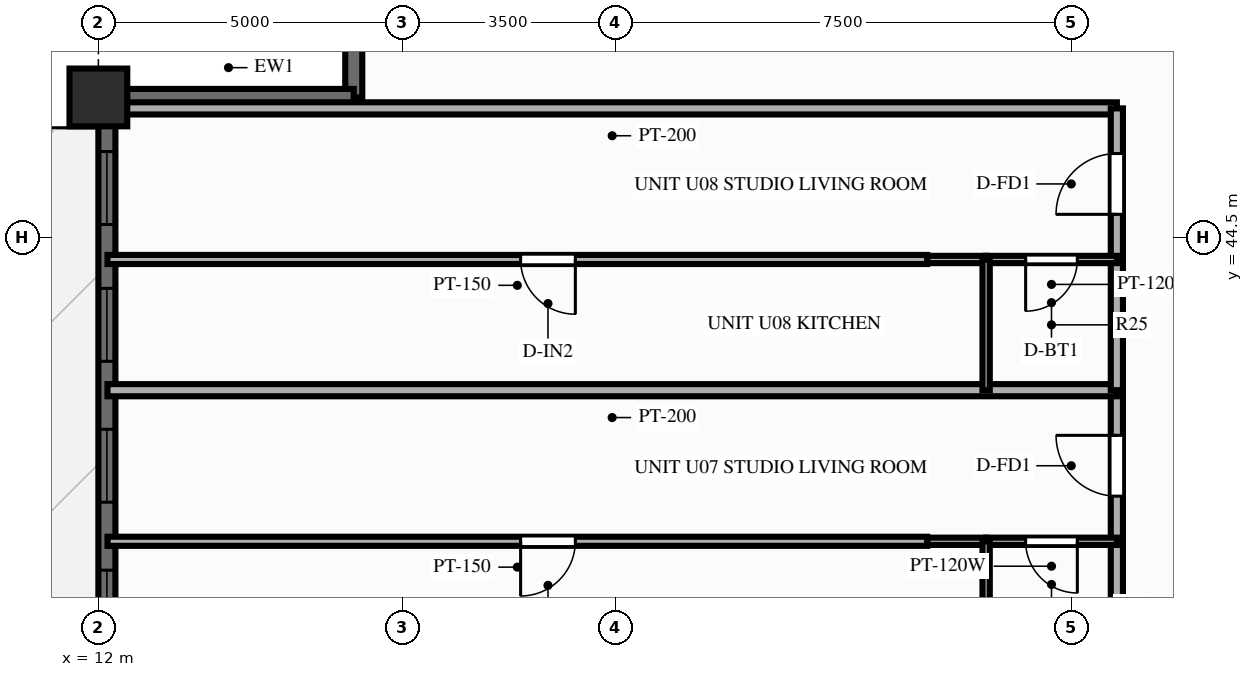
"""IFC4 building model, lengths in metres.
Left out: names, types, materials, properties, quantities, classifications, styles, units other than length and angle.
Written with IfcOpenShell. Run it as: python <this file> out.ifc"""

import sys

from ifc_helpers import new_model, si_unit, direction, frame, frame_2d, origin, origin_2d, place, context, subcontext, project, spatial, rectangle, extrude, source, transform, mapped, element, fill, save


model = new_model("IFC4")
c1 = context("Model", 3, precision=1e-05, world=origin(), true_north=direction((0.0, 1.0)))
c2 = subcontext(c1, "Body", "Model", "MODEL_VIEW")
j1 = project(units=[si_unit("LENGTHUNIT", "METRE"), si_unit("PLANEANGLEUNIT", "RADIAN")], contexts=[c1])
p1 = place(None, origin())
s1 = spatial("IfcSite", under=j1, at=p1, CompositionType="ELEMENT")
p2 = place(p1, origin())
s2 = spatial("IfcBuilding", under=s1, at=p2, CompositionType="ELEMENT")
p3 = place(p2, frame((0.0, 0.0, 122.85)))
s3 = spatial("IfcBuildingStorey", under=s2, at=p3, CompositionType="ELEMENT", Elevation=122.85)
m1 = source(origin(), c2, "Body", "SweptSolid", [
    extrude(rectangle(XDim=0.95, YDim=0.95, at=origin_2d()), origin(), (0.0, 0.0, 1.0), 3.9),
])
p4 = place(p3, frame((12.0, 46.8, 0.0), z_axis=(0.0, 0.0, 1.0), x_axis=(1.0, 0.0, 0.0)))
e1 = element("IfcColumn", 1, at=p4, inside=s3, PredefinedType="COLUMN", context=c2, shape_type="MappedRepresentation", body=[
    mapped(m1, transform((0.0, 0.0, 0.0), scale=1.0)),
])
p5 = place(p3, frame((12.14, 7.2, 0.0), z_axis=(0.0, 0.0, 1.0), x_axis=(0.0, 1.0, 0.0)))
e2 = element("IfcWall", 2, at=p5, inside=s3, PredefinedType="SOLIDWALL", context=c2, shape_type="SweptSolid", body=[
    extrude(rectangle(XDim=39.6, YDim=0.28, at=frame_2d((19.8, 0.0))), origin(), (0.0, 0.0, 1.0), 2.24),
])
p6 = place(p5, frame((0.89, 0.0, 0.25)))
e3 = element("IfcOpeningElement", 3, at=p6, cuts=e2, PredefinedType="OPENING", context=c2, shape_type="SweptSolid", body=[
    extrude(rectangle(XDim=1.2, YDim=1.5, at=frame_2d((0.6, 0.75))), frame((0.0, 0.152, 0.0), z_axis=(0.0, -1.0, 0.0), x_axis=(1.0, 0.0, 0.0)), (0.0, 0.0, 1.0), 0.304),
])
p7 = place(p5, frame((3.14, 0.0, 0.25)))
e4 = element("IfcOpeningElement", 4, at=p7, cuts=e2, PredefinedType="OPENING", context=c2, shape_type="SweptSolid", body=[
    extrude(rectangle(XDim=1.2, YDim=1.5, at=frame_2d((0.6, 0.75))), frame((0.0, 0.152, 0.0), z_axis=(0.0, -1.0, 0.0), x_axis=(1.0, 0.0, 0.0)), (0.0, 0.0, 1.0), 0.304),
])
p8 = place(p5, frame((5.458, 0.0, 0.25)))
e5 = element("IfcOpeningElement", 5, at=p8, cuts=e2, PredefinedType="OPENING", context=c2, shape_type="SweptSolid", body=[
    extrude(rectangle(XDim=1.2, YDim=1.5, at=frame_2d((0.6, 0.75))), frame((0.0, 0.152, 0.0), z_axis=(0.0, -1.0, 0.0), x_axis=(1.0, 0.0, 0.0)), (0.0, 0.0, 1.0), 0.304),
])
p9 = place(p5, frame((7.775, 0.0, 0.25)))
e6 = element("IfcOpeningElement", 6, at=p9, cuts=e2, PredefinedType="OPENING", context=c2, shape_type="SweptSolid", body=[
    extrude(rectangle(XDim=1.2, YDim=1.5, at=frame_2d((0.6, 0.75))), frame((0.0, 0.152, 0.0), z_axis=(0.0, -1.0, 0.0), x_axis=(1.0, 0.0, 0.0)), (0.0, 0.0, 1.0), 0.304),
])
p10 = place(p5, frame((12.242, 0.0, 0.25)))
e7 = element("IfcOpeningElement", 7, at=p10, cuts=e2, PredefinedType="OPENING", context=c2, shape_type="SweptSolid", body=[
    extrude(rectangle(XDim=1.2, YDim=1.5, at=frame_2d((0.6, 0.75))), frame((0.0, 0.152, 0.0), z_axis=(0.0, -1.0, 0.0), x_axis=(1.0, 0.0, 0.0)), (0.0, 0.0, 1.0), 0.304),
])
p11 = place(p5, frame((14.56, 0.0, 0.25)))
e8 = element("IfcOpeningElement", 8, at=p11, cuts=e2, PredefinedType="OPENING", context=c2, shape_type="SweptSolid", body=[
    extrude(rectangle(XDim=1.2, YDim=1.5, at=frame_2d((0.6, 0.75))), frame((0.0, 0.152, 0.0), z_axis=(0.0, -1.0, 0.0), x_axis=(1.0, 0.0, 0.0)), (0.0, 0.0, 1.0), 0.304),
])
p12 = place(p5, frame((16.877, 0.0, 0.25)))
e9 = element("IfcOpeningElement", 9, at=p12, cuts=e2, PredefinedType="OPENING", context=c2, shape_type="SweptSolid", body=[
    extrude(rectangle(XDim=1.2, YDim=1.5, at=frame_2d((0.6, 0.75))), frame((0.0, 0.152, 0.0), z_axis=(0.0, -1.0, 0.0), x_axis=(1.0, 0.0, 0.0)), (0.0, 0.0, 1.0), 0.304),
])
p13 = place(p5, frame((19.25, 0.0, 0.0)))
e10 = element("IfcOpeningElement", 10, at=p13, cuts=e2, PredefinedType="OPENING", context=c2, shape_type="SweptSolid", body=[
    extrude(rectangle(XDim=1.1, YDim=2.15, at=frame_2d((0.55, 1.075))), frame((0.0, 0.152, 0.0), z_axis=(0.0, -1.0, 0.0), x_axis=(1.0, 0.0, 0.0)), (0.0, 0.0, 1.0), 0.304),
])
p14 = place(p5, frame((21.522, 0.0, 0.25)))
e11 = element("IfcOpeningElement", 11, at=p14, cuts=e2, PredefinedType="OPENING", context=c2, shape_type="SweptSolid", body=[
    extrude(rectangle(XDim=1.2, YDim=1.5, at=frame_2d((0.6, 0.75))), frame((0.0, 0.152, 0.0), z_axis=(0.0, -1.0, 0.0), x_axis=(1.0, 0.0, 0.0)), (0.0, 0.0, 1.0), 0.304),
])
p15 = place(p5, frame((23.84, 0.0, 0.25)))
e12 = element("IfcOpeningElement", 12, at=p15, cuts=e2, PredefinedType="OPENING", context=c2, shape_type="SweptSolid", body=[
    extrude(rectangle(XDim=1.2, YDim=1.5, at=frame_2d((0.6, 0.75))), frame((0.0, 0.152, 0.0), z_axis=(0.0, -1.0, 0.0), x_axis=(1.0, 0.0, 0.0)), (0.0, 0.0, 1.0), 0.304),
])
p16 = place(p5, frame((26.157, 0.0, 0.25)))
e13 = element("IfcOpeningElement", 13, at=p16, cuts=e2, PredefinedType="OPENING", context=c2, shape_type="SweptSolid", body=[
    extrude(rectangle(XDim=1.2, YDim=1.5, at=frame_2d((0.6, 0.75))), frame((0.0, 0.152, 0.0), z_axis=(0.0, -1.0, 0.0), x_axis=(1.0, 0.0, 0.0)), (0.0, 0.0, 1.0), 0.304),
])
p17 = place(p5, frame((30.625, 0.0, 0.25)))
e14 = element("IfcOpeningElement", 14, at=p17, cuts=e2, PredefinedType="OPENING", context=c2, shape_type="SweptSolid", body=[
    extrude(rectangle(XDim=1.2, YDim=1.5, at=frame_2d((0.6, 0.75))), frame((0.0, 0.152, 0.0), z_axis=(0.0, -1.0, 0.0), x_axis=(1.0, 0.0, 0.0)), (0.0, 0.0, 1.0), 0.304),
])
p18 = place(p5, frame((32.942, 0.0, 0.25)))
e15 = element("IfcOpeningElement", 15, at=p18, cuts=e2, PredefinedType="OPENING", context=c2, shape_type="SweptSolid", body=[
    extrude(rectangle(XDim=1.2, YDim=1.5, at=frame_2d((0.6, 0.75))), frame((0.0, 0.152, 0.0), z_axis=(0.0, -1.0, 0.0), x_axis=(1.0, 0.0, 0.0)), (0.0, 0.0, 1.0), 0.304),
])
p19 = place(p5, frame((35.26, 0.0, 0.25)))
e16 = element("IfcOpeningElement", 16, at=p19, cuts=e2, PredefinedType="OPENING", context=c2, shape_type="SweptSolid", body=[
    extrude(rectangle(XDim=1.2, YDim=1.5, at=frame_2d((0.6, 0.75))), frame((0.0, 0.152, 0.0), z_axis=(0.0, -1.0, 0.0), x_axis=(1.0, 0.0, 0.0)), (0.0, 0.0, 1.0), 0.304),
])
p20 = place(p5, frame((37.51, 0.0, 0.25)))
e17 = element("IfcOpeningElement", 17, at=p20, cuts=e2, PredefinedType="OPENING", context=c2, shape_type="SweptSolid", body=[
    extrude(rectangle(XDim=1.2, YDim=1.5, at=frame_2d((0.6, 0.75))), frame((0.0, 0.152, 0.0), z_axis=(0.0, -1.0, 0.0), x_axis=(1.0, 0.0, 0.0)), (0.0, 0.0, 1.0), 0.304),
])
for number, where, z_axis, x_axis in (
    (18, (16.2, 46.8, 0.0), (0.0, 0.0, 1.0), (0.0, 1.0, 0.0)),
    (19, (12.08, 46.8, 0.0), (0.0, 0.0, 1.0), (1.0, 0.0, 0.0)),
):
    element("IfcWall", number, at=place(p3, frame(where, z_axis=z_axis, x_axis=x_axis)), inside=s3, PredefinedType="SOLIDWALL", context=c2, shape_type="SweptSolid", body=[
        extrude(rectangle(XDim=4.12, YDim=0.28, at=frame_2d((2.06, 0.0))), origin(), (0.0, 0.0, 1.0), 2.24),
    ])
p21 = place(p3, frame((28.75, 46.62, 0.0), z_axis=(0.0, 0.0, 1.0), x_axis=(-1.0, 0.0, 0.0)))
e20 = element("IfcWall", 20, at=p21, inside=s3, PredefinedType="PARTITIONING", context=c2, shape_type="SweptSolid", body=[
    extrude(rectangle(XDim=16.6, YDim=0.2, at=frame_2d((8.3, 0.0))), origin(), (0.0, 0.0, 1.0), 3.56),
])
p22 = place(p3, frame((28.75, 37.35, 0.0), z_axis=(0.0, 0.0, 1.0), x_axis=(0.0, 1.0, 0.0)))
e21 = element("IfcWall", 21, at=p22, inside=s3, PredefinedType="PARTITIONING", context=c2, shape_type="SweptSolid", body=[
    extrude(rectangle(XDim=2.15, YDim=0.2, at=frame_2d((1.075, 0.0))), origin(), (0.0, 0.0, 1.0), 3.56),
])
p23 = place(p3, frame((28.75, 39.5, 0.0), z_axis=(0.0, 0.0, 1.0), x_axis=(0.0, 1.0, 0.0)))
e22 = element("IfcWall", 22, at=p23, inside=s3, PredefinedType="PARTITIONING", context=c2, shape_type="SweptSolid", body=[
    extrude(rectangle(XDim=2.485, YDim=0.2, at=frame_2d((1.243, 0.0))), origin(), (0.0, 0.0, 1.0), 3.56),
])
p24 = place(p23, frame((0.742, 0.0, 0.0)))
e23 = element("IfcOpeningElement", 23, at=p24, cuts=e22, PredefinedType="OPENING", context=c2, shape_type="SweptSolid", body=[
    extrude(rectangle(XDim=1.0, YDim=2.15, at=frame_2d((0.5, 1.075))), frame((0.0, 0.112, 0.0), z_axis=(0.0, -1.0, 0.0), x_axis=(1.0, 0.0, 0.0)), (0.0, 0.0, 1.0), 0.224),
])
p25 = place(p3, frame((28.75, 39.5, 0.0), z_axis=(0.0, 0.0, 1.0), x_axis=(-1.0, 0.0, 0.0)))
e24 = element("IfcWall", 24, at=p25, inside=s3, PredefinedType="PARTITIONING", context=c2, shape_type="SweptSolid", body=[
    extrude(rectangle(XDim=2.15, YDim=0.12, at=frame_2d((1.075, 0.0))), origin(), (0.0, 0.0, 1.0), 3.56),
])
p26 = place(p25, frame((0.65, 0.0, 0.0)))
e25 = element("IfcOpeningElement", 25, at=p26, cuts=e24, PredefinedType="OPENING", context=c2, shape_type="SweptSolid", body=[
    extrude(rectangle(XDim=0.85, YDim=2.05, at=frame_2d((0.425, 1.025))), frame((0.0, 0.072, 0.0), z_axis=(0.0, -1.0, 0.0), x_axis=(1.0, 0.0, 0.0)), (0.0, 0.0, 1.0), 0.144),
])
p27 = place(p3, frame((26.6, 39.5, 0.0), z_axis=(0.0, 0.0, 1.0), x_axis=(-1.0, 0.0, 0.0)))
e26 = element("IfcWall", 26, at=p27, inside=s3, PredefinedType="PARTITIONING", context=c2, shape_type="SweptSolid", body=[
    extrude(rectangle(XDim=0.97, YDim=0.12, at=frame_2d((0.485, 0.0))), origin(), (0.0, 0.0, 1.0), 3.56),
])
p28 = place(p3, frame((26.6, 37.35, 0.0), z_axis=(0.0, 0.0, 1.0), x_axis=(0.0, 1.0, 0.0)))
e27 = element("IfcWall", 27, at=p28, inside=s3, PredefinedType="PARTITIONING", context=c2, shape_type="SweptSolid", body=[
    extrude(rectangle(XDim=2.15, YDim=0.12, at=frame_2d((1.075, 0.0))), origin(), (0.0, 0.0, 1.0), 3.56),
])
p29 = place(p3, frame((25.63, 39.5, 0.0), z_axis=(0.0, 0.0, 1.0), x_axis=(-1.0, 0.0, 0.0)))
e28 = element("IfcWall", 28, at=p29, inside=s3, PredefinedType="PARTITIONING", context=c2, shape_type="SweptSolid", body=[
    extrude(rectangle(XDim=13.48, YDim=0.15, at=frame_2d((6.74, 0.0))), origin(), (0.0, 0.0, 1.0), 3.56),
])
p30 = place(p29, frame((5.786, 0.0, 0.0)))
e29 = element("IfcOpeningElement", 29, at=p30, cuts=e28, PredefinedType="OPENING", context=c2, shape_type="SweptSolid", body=[
    extrude(rectangle(XDim=0.9, YDim=2.1, at=frame_2d((0.45, 1.05))), frame((0.0, 0.087, 0.0), z_axis=(0.0, -1.0, 0.0), x_axis=(1.0, 0.0, 0.0)), (0.0, 0.0, 1.0), 0.174),
])
p31 = place(p3, frame((28.75, 41.985, 0.0), z_axis=(0.0, 0.0, 1.0), x_axis=(-1.0, 0.0, 0.0)))
e30 = element("IfcWall", 30, at=p31, inside=s3, PredefinedType="PARTITIONING", context=c2, shape_type="SweptSolid", body=[
    extrude(rectangle(XDim=16.6, YDim=0.2, at=frame_2d((8.3, 0.0))), origin(), (0.0, 0.0, 1.0), 3.56),
])
p32 = place(p3, frame((28.75, 41.985, 0.0), z_axis=(0.0, 0.0, 1.0), x_axis=(0.0, 1.0, 0.0)))
e31 = element("IfcWall", 31, at=p32, inside=s3, PredefinedType="PARTITIONING", context=c2, shape_type="SweptSolid", body=[
    extrude(rectangle(XDim=2.15, YDim=0.2, at=frame_2d((1.075, 0.0))), origin(), (0.0, 0.0, 1.0), 3.56),
])
p33 = place(p3, frame((28.75, 44.135, 0.0), z_axis=(0.0, 0.0, 1.0), x_axis=(0.0, 1.0, 0.0)))
e32 = element("IfcWall", 32, at=p33, inside=s3, PredefinedType="PARTITIONING", context=c2, shape_type="SweptSolid", body=[
    extrude(rectangle(XDim=2.485, YDim=0.2, at=frame_2d((1.243, 0.0))), origin(), (0.0, 0.0, 1.0), 3.56),
])
p34 = place(p33, frame((0.742, 0.0, 0.0)))
e33 = element("IfcOpeningElement", 33, at=p34, cuts=e32, PredefinedType="OPENING", context=c2, shape_type="SweptSolid", body=[
    extrude(rectangle(XDim=1.0, YDim=2.15, at=frame_2d((0.5, 1.075))), frame((0.0, 0.112, 0.0), z_axis=(0.0, -1.0, 0.0), x_axis=(1.0, 0.0, 0.0)), (0.0, 0.0, 1.0), 0.224),
])
p35 = place(p3, frame((28.75, 44.135, 0.0), z_axis=(0.0, 0.0, 1.0), x_axis=(-1.0, 0.0, 0.0)))
e34 = element("IfcWall", 34, at=p35, inside=s3, PredefinedType="PARTITIONING", context=c2, shape_type="SweptSolid", body=[
    extrude(rectangle(XDim=2.15, YDim=0.12, at=frame_2d((1.075, 0.0))), origin(), (0.0, 0.0, 1.0), 3.56),
])
p36 = place(p35, frame((0.65, 0.0, 0.0)))
e35 = element("IfcOpeningElement", 35, at=p36, cuts=e34, PredefinedType="OPENING", context=c2, shape_type="SweptSolid", body=[
    extrude(rectangle(XDim=0.85, YDim=2.05, at=frame_2d((0.425, 1.025))), frame((0.0, 0.072, 0.0), z_axis=(0.0, -1.0, 0.0), x_axis=(1.0, 0.0, 0.0)), (0.0, 0.0, 1.0), 0.144),
])
p37 = place(p3, frame((26.6, 44.135, 0.0), z_axis=(0.0, 0.0, 1.0), x_axis=(-1.0, 0.0, 0.0)))
e36 = element("IfcWall", 36, at=p37, inside=s3, PredefinedType="PARTITIONING", context=c2, shape_type="SweptSolid", body=[
    extrude(rectangle(XDim=0.97, YDim=0.12, at=frame_2d((0.485, 0.0))), origin(), (0.0, 0.0, 1.0), 3.56),
])
p38 = place(p3, frame((26.6, 41.985, 0.0), z_axis=(0.0, 0.0, 1.0), x_axis=(0.0, 1.0, 0.0)))
e37 = element("IfcWall", 37, at=p38, inside=s3, PredefinedType="PARTITIONING", context=c2, shape_type="SweptSolid", body=[
    extrude(rectangle(XDim=2.15, YDim=0.12, at=frame_2d((1.075, 0.0))), origin(), (0.0, 0.0, 1.0), 3.56),
])
p39 = place(p3, frame((25.63, 44.135, 0.0), z_axis=(0.0, 0.0, 1.0), x_axis=(-1.0, 0.0, 0.0)))
e38 = element("IfcWall", 38, at=p39, inside=s3, PredefinedType="PARTITIONING", context=c2, shape_type="SweptSolid", body=[
    extrude(rectangle(XDim=13.48, YDim=0.15, at=frame_2d((6.74, 0.0))), origin(), (0.0, 0.0, 1.0), 3.56),
])
p40 = place(p39, frame((5.786, 0.0, 0.0)))
e39 = element("IfcOpeningElement", 39, at=p40, cuts=e38, PredefinedType="OPENING", context=c2, shape_type="SweptSolid", body=[
    extrude(rectangle(XDim=0.9, YDim=2.1, at=frame_2d((0.45, 1.05))), frame((0.0, 0.087, 0.0), z_axis=(0.0, -1.0, 0.0), x_axis=(1.0, 0.0, 0.0)), (0.0, 0.0, 1.0), 0.174),
])
m2 = source(origin(), c2, "Body", "SweptSolid", [
    extrude(rectangle(XDim=1.2, YDim=1.5, at=frame_2d((0.6, 0.75))), frame((0.0, 0.03, 0.0), z_axis=(0.0, -1.0, 0.0), x_axis=(1.0, 0.0, 0.0)), (0.0, 0.0, 1.0), 0.06),
])
p41 = place(p17, origin())
e40 = element("IfcWindow", 40, at=p41, inside=s3, PartitioningType="SINGLE_PANEL", PredefinedType="WINDOW", context=c2, shape_type="MappedRepresentation", body=[
    mapped(m2, transform((0.0, 0.0, 0.0), scale=1.0)),
])
fill(e14, e40)
p42 = place(p18, origin())
e41 = element("IfcWindow", 41, at=p42, inside=s3, PartitioningType="SINGLE_PANEL", PredefinedType="WINDOW", context=c2, shape_type="MappedRepresentation", body=[
    mapped(m2, transform((0.0, 0.0, 0.0), scale=1.0)),
])
fill(e15, e41)
p43 = place(p19, origin())
e42 = element("IfcWindow", 42, at=p43, inside=s3, PartitioningType="SINGLE_PANEL", PredefinedType="WINDOW", context=c2, shape_type="MappedRepresentation", body=[
    mapped(m2, transform((0.0, 0.0, 0.0), scale=1.0)),
])
fill(e16, e42)
p44 = place(p20, origin())
e43 = element("IfcWindow", 43, at=p44, inside=s3, PartitioningType="SINGLE_PANEL", PredefinedType="WINDOW", context=c2, shape_type="MappedRepresentation", body=[
    mapped(m2, transform((0.0, 0.0, 0.0), scale=1.0)),
])
fill(e17, e43)
m3 = source(origin(), c2, "Body", "SweptSolid", [
    extrude(rectangle(XDim=1.0, YDim=2.15, at=frame_2d((0.5, 1.075))), frame((0.0, 0.025, 0.0), z_axis=(0.0, -1.0, 0.0), x_axis=(1.0, 0.0, 0.0)), (0.0, 0.0, 1.0), 0.05),
])
p45 = place(p24, origin())
e44 = element("IfcDoor", 44, at=p45, inside=s3, OperationType="SINGLE_SWING_RIGHT", PredefinedType="DOOR", context=c2, shape_type="MappedRepresentation", body=[
    mapped(m3, transform((0.0, 0.0, 0.0), scale=1.0)),
])
fill(e23, e44)
m4 = source(origin(), c2, "Body", "SweptSolid", [
    extrude(rectangle(XDim=0.85, YDim=2.05, at=frame_2d((0.425, 1.025))), frame((0.0, 0.025, 0.0), z_axis=(0.0, -1.0, 0.0), x_axis=(1.0, 0.0, 0.0)), (0.0, 0.0, 1.0), 0.05),
])
p46 = place(p26, origin())
e45 = element("IfcDoor", 45, at=p46, inside=s3, OperationType="SINGLE_SWING_LEFT", PredefinedType="DOOR", context=c2, shape_type="MappedRepresentation", body=[
    mapped(m4, transform((0.0, 0.0, 0.0), scale=1.0)),
])
fill(e25, e45)
m5 = source(origin(), c2, "Body", "SweptSolid", [
    extrude(rectangle(XDim=0.9, YDim=2.1, at=frame_2d((0.45, 1.05))), frame((0.0, 0.025, 0.0), z_axis=(0.0, -1.0, 0.0), x_axis=(1.0, 0.0, 0.0)), (0.0, 0.0, 1.0), 0.05),
])
p47 = place(p30, origin())
e46 = element("IfcDoor", 46, at=p47, inside=s3, OperationType="SINGLE_SWING_RIGHT", PredefinedType="DOOR", context=c2, shape_type="MappedRepresentation", body=[
    mapped(m5, transform((0.0, 0.0, 0.0), scale=1.0)),
])
fill(e29, e46)
p48 = place(p34, origin())
e47 = element("IfcDoor", 47, at=p48, inside=s3, OperationType="SINGLE_SWING_LEFT", PredefinedType="DOOR", context=c2, shape_type="MappedRepresentation", body=[
    mapped(m3, transform((0.0, 0.0, 0.0), scale=1.0)),
])
fill(e33, e47)
p49 = place(p36, origin())
e48 = element("IfcDoor", 48, at=p49, inside=s3, OperationType="SINGLE_SWING_RIGHT", PredefinedType="DOOR", context=c2, shape_type="MappedRepresentation", body=[
    mapped(m4, transform((0.0, 0.0, 0.0), scale=1.0)),
])
fill(e35, e48)
p50 = place(p40, origin())
e49 = element("IfcDoor", 49, at=p50, inside=s3, OperationType="SINGLE_SWING_LEFT", PredefinedType="DOOR", context=c2, shape_type="MappedRepresentation", body=[
    mapped(m5, transform((0.0, 0.0, 0.0), scale=1.0)),
])
fill(e39, e49)
save(model, sys.argv[1])
